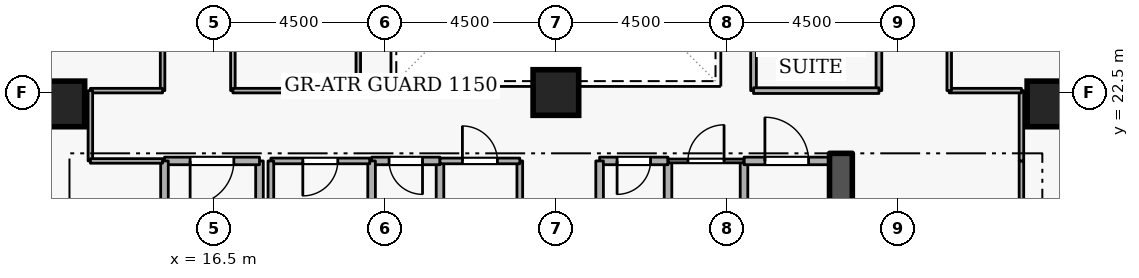
"""IFC4 building model, lengths in metres.
Left out: names, types, materials, properties, quantities, classifications, styles, units other than length and angle.
Written with IfcOpenShell. Run it as: python <this file> out.ifc"""

import sys

from ifc_helpers import new_model, si_unit, direction, frame, frame_2d, origin, origin_2d, place, context, subcontext, project, spatial, rectangle, extrude, element, fill, save


model = new_model("IFC4")
c1 = context("Model", 3, precision=1e-05, world=origin(), true_north=direction((0.0, 1.0)))
c2 = subcontext(c1, "Body", "Model", "MODEL_VIEW")
j1 = project(units=[si_unit("LENGTHUNIT", "METRE"), si_unit("PLANEANGLEUNIT", "RADIAN")], contexts=[c1])
p1 = place(None, origin())
s1 = spatial("IfcSite", under=j1, at=p1, CompositionType="ELEMENT")
p2 = place(p1, origin())
s2 = spatial("IfcBuilding", under=s1, at=p2, CompositionType="ELEMENT")
p3 = place(p2, frame((0.0, 0.0, 90.9)))
s3 = spatial("IfcBuildingStorey", under=s2, at=p3, CompositionType="ELEMENT", Elevation=90.9)
p4 = place(p3, frame((33.0, 15.2, 0.0), z_axis=(0.0, 0.0, 1.0), x_axis=(0.0, 1.0, 0.0)))
e1 = element("IfcWall", 1, at=p4, inside=s3, PredefinedType="SHEAR", context=c2, shape_type="SweptSolid", body=[
    extrude(rectangle(XDim=5.7, YDim=0.6, at=frame_2d((2.85, 0.0))), origin(), (0.0, 0.0, 1.0), 3.6),
])
for number, where, z_axis, x_axis in (
    (2, (12.5, 22.2, 0.0), (0.0, 0.0, 1.0), (1.0, 0.0, 0.0)),
    (3, (38.5, 22.2, 0.0), (0.0, 0.0, 1.0), (1.0, 0.0, 0.0)),
    (4, (25.5, 22.5, 0.0), (0.0, 0.0, 1.0), (1.0, 0.0, 0.0)),
):
    element("IfcColumn", number, at=place(p3, frame(where, z_axis=z_axis, x_axis=x_axis)), inside=s3, PredefinedType="COLUMN", context=c2, shape_type="SweptSolid", body=[
        extrude(rectangle(XDim=1.2, YDim=1.2, at=origin_2d()), origin(), (0.0, 0.0, 1.0), 3.6),
    ])
p5 = place(p3, frame((17.7, 18.4, 0.0), z_axis=(0.0, 0.0, 1.0), x_axis=(0.0, 1.0, 0.0)))
e5 = element("IfcWall", 5, at=p5, inside=s3, PredefinedType="STANDARD", context=c2, shape_type="SweptSolid", body=[
    extrude(rectangle(XDim=2.3, YDim=0.2, at=frame_2d((1.15, 0.0))), origin(), (0.0, 0.0, 1.0), 2.545),
])
p6 = place(p3, frame((17.7, 20.7, 0.0), z_axis=(0.0, 0.0, 1.0), x_axis=(-1.0, 0.0, 0.0)))
e6 = element("IfcWall", 6, at=p6, inside=s3, PredefinedType="STANDARD", context=c2, shape_type="SweptSolid", body=[
    extrude(rectangle(XDim=2.5, YDim=0.2, at=frame_2d((1.25, 0.0))), origin(), (0.0, 0.0, 1.0), 3.34),
])
p7 = place(p6, frame((0.675, 0.0, 0.0)))
e7 = element("IfcOpeningElement", 7, at=p7, cuts=e6, PredefinedType="OPENING", context=c2, shape_type="SweptSolid", body=[
    extrude(rectangle(XDim=1.15, YDim=2.1, at=frame_2d((0.575, 1.05))), frame((0.0, 0.11, 0.0), z_axis=(0.0, -1.0, 0.0), x_axis=(1.0, 0.0, 0.0)), (0.0, 0.0, 1.0), 0.22),
])
p8 = place(p3, frame((15.2, 20.7, 0.0), z_axis=(0.0, 0.0, 1.0), x_axis=(0.0, -1.0, 0.0)))
e8 = element("IfcWall", 8, at=p8, inside=s3, PredefinedType="STANDARD", context=c2, shape_type="SweptSolid", body=[
    extrude(rectangle(XDim=5.7, YDim=0.2, at=frame_2d((2.85, 0.0))), origin(), (0.0, 0.0, 1.0), 3.34),
])
p9 = place(p3, frame((28.45, 18.65, 0.0), z_axis=(0.0, 0.0, 1.0), x_axis=(0.0, 1.0, 0.0)))
e9 = element("IfcWall", 9, at=p9, inside=s3, PredefinedType="STANDARD", context=c2, shape_type="SweptSolid", body=[
    extrude(rectangle(XDim=2.05, YDim=0.2, at=frame_2d((1.025, 0.0))), origin(), (0.0, 0.0, 1.0), 3.34),
])
p10 = place(p3, frame((28.45, 20.7, 0.0), z_axis=(0.0, 0.0, 1.0), x_axis=(-1.0, 0.0, 0.0)))
e10 = element("IfcWall", 10, at=p10, inside=s3, PredefinedType="STANDARD", context=c2, shape_type="SweptSolid", body=[
    extrude(rectangle(XDim=1.8, YDim=0.2, at=frame_2d((0.9, 0.0))), origin(), (0.0, 0.0, 1.0), 3.34),
])
p11 = place(p10, frame((0.46, 0.0, 0.0)))
e11 = element("IfcOpeningElement", 11, at=p11, cuts=e10, PredefinedType="OPENING", context=c2, shape_type="SweptSolid", body=[
    extrude(rectangle(XDim=0.88, YDim=2.04, at=frame_2d((0.44, 1.02))), frame((0.0, 0.11, 0.0), z_axis=(0.0, -1.0, 0.0), x_axis=(1.0, 0.0, 0.0)), (0.0, 0.0, 1.0), 0.22),
])
for number, where, z_axis, x_axis in (
    (12, (26.65, 20.7, 0.0), (0.0, 0.0, 1.0), (0.0, -1.0, 0.0)),
    (13, (22.45, 18.65, 0.0), (0.0, 0.0, 1.0), (0.0, 1.0, 0.0)),
):
    element("IfcWall", number, at=place(p3, frame(where, z_axis=z_axis, x_axis=x_axis)), inside=s3, PredefinedType="STANDARD", context=c2, shape_type="SweptSolid", body=[
        extrude(rectangle(XDim=2.05, YDim=0.2, at=frame_2d((1.025, 0.0))), origin(), (0.0, 0.0, 1.0), 3.34),
    ])
p12 = place(p3, frame((22.45, 20.7, 0.0), z_axis=(0.0, 0.0, 1.0), x_axis=(-1.0, 0.0, 0.0)))
e14 = element("IfcWall", 14, at=p12, inside=s3, PredefinedType="STANDARD", context=c2, shape_type="SweptSolid", body=[
    extrude(rectangle(XDim=1.8, YDim=0.2, at=frame_2d((0.9, 0.0))), origin(), (0.0, 0.0, 1.0), 3.34),
])
p13 = place(p12, frame((0.46, 0.0, 0.0)))
e15 = element("IfcOpeningElement", 15, at=p13, cuts=e14, PredefinedType="OPENING", context=c2, shape_type="SweptSolid", body=[
    extrude(rectangle(XDim=0.88, YDim=2.04, at=frame_2d((0.44, 1.02))), frame((0.0, 0.11, 0.0), z_axis=(0.0, -1.0, 0.0), x_axis=(1.0, 0.0, 0.0)), (0.0, 0.0, 1.0), 0.22),
])
for number, where, z_axis, x_axis in (
    (16, (20.65, 20.7, 0.0), (0.0, 0.0, 1.0), (0.0, -1.0, 0.0)),
    (17, (30.45, 18.65, 0.0), (0.0, 0.0, 1.0), (0.0, 1.0, 0.0)),
):
    element("IfcWall", number, at=place(p3, frame(where, z_axis=z_axis, x_axis=x_axis)), inside=s3, PredefinedType="STANDARD", context=c2, shape_type="SweptSolid", body=[
        extrude(rectangle(XDim=2.05, YDim=0.2, at=frame_2d((1.025, 0.0))), origin(), (0.0, 0.0, 1.0), 3.34),
    ])
p14 = place(p3, frame((30.45, 20.7, 0.0), z_axis=(0.0, 0.0, 1.0), x_axis=(1.0, 0.0, 0.0)))
e18 = element("IfcWall", 18, at=p14, inside=s3, PredefinedType="STANDARD", context=c2, shape_type="SweptSolid", body=[
    extrude(rectangle(XDim=2.25, YDim=0.2, at=frame_2d((1.125, 0.0))), origin(), (0.0, 0.0, 1.0), 3.34),
])
p15 = place(p14, frame((0.55, 0.0, 0.0)))
e19 = element("IfcOpeningElement", 19, at=p15, cuts=e18, PredefinedType="OPENING", context=c2, shape_type="SweptSolid", body=[
    extrude(rectangle(XDim=1.15, YDim=2.1, at=frame_2d((0.575, 1.05))), frame((0.0, 0.11, 0.0), z_axis=(0.0, -1.0, 0.0), x_axis=(1.0, 0.0, 0.0)), (0.0, 0.0, 1.0), 0.22),
])
p16 = place(p3, frame((20.6, 20.7, 0.0), z_axis=(0.0, 0.0, 1.0), x_axis=(-1.0, 0.0, 0.0)))
e20 = element("IfcWall", 20, at=p16, inside=s3, PredefinedType="PARTITIONING", context=c2, shape_type="SweptSolid", body=[
    extrude(rectangle(XDim=2.6, YDim=0.15, at=frame_2d((1.3, 0.0))), origin(), (0.0, 0.0, 1.0), 3.34),
])
p17 = place(p16, frame((0.84, 0.0, 0.0)))
e21 = element("IfcOpeningElement", 21, at=p17, cuts=e20, PredefinedType="OPENING", context=c2, shape_type="SweptSolid", body=[
    extrude(rectangle(XDim=0.92, YDim=2.08, at=frame_2d((0.46, 1.04))), frame((0.0, 0.085, 0.0), z_axis=(0.0, -1.0, 0.0), x_axis=(1.0, 0.0, 0.0)), (0.0, 0.0, 1.0), 0.17),
])
p18 = place(p3, frame((18.0, 20.7, 0.0), z_axis=(0.0, 0.0, 1.0), x_axis=(0.0, -1.0, 0.0)))
e22 = element("IfcWall", 22, at=p18, inside=s3, PredefinedType="PARTITIONING", context=c2, shape_type="SweptSolid", body=[
    extrude(rectangle(XDim=2.05, YDim=0.15, at=frame_2d((1.025, 0.0))), origin(), (0.0, 0.0, 1.0), 2.545),
])
p19 = place(p3, frame((24.55, 20.7, 0.0), z_axis=(0.0, 0.0, 1.0), x_axis=(0.0, -1.0, 0.0)))
e23 = element("IfcWall", 23, at=p19, inside=s3, PredefinedType="PARTITIONING", context=c2, shape_type="SweptSolid", body=[
    extrude(rectangle(XDim=2.05, YDim=0.15, at=frame_2d((1.025, 0.0))), origin(), (0.0, 0.0, 1.0), 3.34),
])
p20 = place(p3, frame((22.45, 20.7, 0.0), z_axis=(0.0, 0.0, 1.0), x_axis=(1.0, 0.0, 0.0)))
e24 = element("IfcWall", 24, at=p20, inside=s3, PredefinedType="PARTITIONING", context=c2, shape_type="SweptSolid", body=[
    extrude(rectangle(XDim=2.1, YDim=0.15, at=frame_2d((1.05, 0.0))), origin(), (0.0, 0.0, 1.0), 3.34),
])
p21 = place(p20, frame((0.59, 0.0, 0.0)))
e25 = element("IfcOpeningElement", 25, at=p21, cuts=e24, PredefinedType="OPENING", context=c2, shape_type="SweptSolid", body=[
    extrude(rectangle(XDim=0.92, YDim=2.08, at=frame_2d((0.46, 1.04))), frame((0.0, 0.085, 0.0), z_axis=(0.0, -1.0, 0.0), x_axis=(1.0, 0.0, 0.0)), (0.0, 0.0, 1.0), 0.17),
])
p22 = place(p3, frame((28.45, 20.7, 0.0), z_axis=(0.0, 0.0, 1.0), x_axis=(1.0, 0.0, 0.0)))
e26 = element("IfcWall", 26, at=p22, inside=s3, PredefinedType="PARTITIONING", context=c2, shape_type="SweptSolid", body=[
    extrude(rectangle(XDim=2.0, YDim=0.1, at=frame_2d((1.0, 0.0))), origin(), (0.0, 0.0, 1.0), 3.34),
])
p23 = place(p22, frame((0.525, 0.0, 0.0)))
e27 = element("IfcOpeningElement", 27, at=p23, cuts=e26, PredefinedType="OPENING", context=c2, shape_type="SweptSolid", body=[
    extrude(rectangle(XDim=0.95, YDim=2.1, at=frame_2d((0.475, 1.05))), frame((0.0, 0.06, 0.0), z_axis=(0.0, -1.0, 0.0), x_axis=(1.0, 0.0, 0.0)), (0.0, 0.0, 1.0), 0.12),
])
p24 = place(p3, frame((15.15, 27.0, 0.0), z_axis=(0.0, 0.0, 1.0), x_axis=(0.0, -1.0, 0.0)))
e28 = element("IfcWall", 28, at=p24, inside=s3, PredefinedType="PARTITIONING", context=c2, shape_type="SweptSolid", body=[
    extrude(rectangle(XDim=4.45, YDim=0.12, at=frame_2d((2.225, 0.0))), origin(), (0.0, 0.0, 1.0), 3.34),
])
p25 = place(p24, frame((1.7, 0.0, 0.0)))
e29 = element("IfcOpeningElement", 29, at=p25, cuts=e28, PredefinedType="OPENING", context=c2, shape_type="SweptSolid", body=[
    extrude(rectangle(XDim=1.05, YDim=2.1, at=frame_2d((0.525, 1.05))), frame((0.0, 0.07, 0.0), z_axis=(0.0, -1.0, 0.0), x_axis=(1.0, 0.0, 0.0)), (0.0, 0.0, 1.0), 0.14),
])
p26 = place(p3, frame((15.15, 22.55, 0.0), z_axis=(0.0, 0.0, 1.0), x_axis=(-1.0, 0.0, 0.0)))
e30 = element("IfcWall", 30, at=p26, inside=s3, PredefinedType="PARTITIONING", context=c2, shape_type="SweptSolid", body=[
    extrude(rectangle(XDim=1.9, YDim=0.12, at=frame_2d((0.95, 0.0))), origin(), (0.0, 0.0, 1.0), 3.34),
])
p27 = place(p3, frame((13.25, 22.55, 0.0), z_axis=(0.0, 0.0, 1.0), x_axis=(0.0, -1.0, 0.0)))
e31 = element("IfcWall", 31, at=p27, inside=s3, PredefinedType="PARTITIONING", context=c2, shape_type="SweptSolid", body=[
    extrude(rectangle(XDim=1.85, YDim=0.12, at=frame_2d((0.925, 0.0))), origin(), (0.0, 0.0, 1.0), 3.34),
])
p28 = place(p3, frame((13.25, 20.7, 0.0), z_axis=(0.0, 0.0, 1.0), x_axis=(1.0, 0.0, 0.0)))
e32 = element("IfcWall", 32, at=p28, inside=s3, PredefinedType="PARTITIONING", context=c2, shape_type="SweptSolid", body=[
    extrude(rectangle(XDim=1.9, YDim=0.12, at=frame_2d((0.95, 0.0))), origin(), (0.0, 0.0, 1.0), 3.34),
])
p29 = place(p3, frame((37.75, 17.55, 0.0), z_axis=(0.0, 0.0, 1.0), x_axis=(0.0, 1.0, 0.0)))
e33 = element("IfcWall", 33, at=p29, inside=s3, PredefinedType="PARTITIONING", context=c2, shape_type="SweptSolid", body=[
    extrude(rectangle(XDim=3.15, YDim=0.12, at=frame_2d((1.575, 0.0))), origin(), (0.0, 0.0, 1.0), 3.34),
])
p30 = place(p3, frame((37.75, 20.7, 0.0), z_axis=(0.0, 0.0, 1.0), x_axis=(0.0, 1.0, 0.0)))
e34 = element("IfcWall", 34, at=p30, inside=s3, PredefinedType="PARTITIONING", context=c2, shape_type="SweptSolid", body=[
    extrude(rectangle(XDim=1.85, YDim=0.12, at=frame_2d((0.925, 0.0))), origin(), (0.0, 0.0, 1.0), 3.34),
])
p31 = place(p3, frame((37.75, 22.55, 0.0), z_axis=(0.0, 0.0, 1.0), x_axis=(-1.0, 0.0, 0.0)))
e35 = element("IfcWall", 35, at=p31, inside=s3, PredefinedType="PARTITIONING", context=c2, shape_type="SweptSolid", body=[
    extrude(rectangle(XDim=1.9, YDim=0.12, at=frame_2d((0.95, 0.0))), origin(), (0.0, 0.0, 1.0), 3.34),
])
p32 = place(p3, frame((35.85, 22.55, 0.0), z_axis=(0.0, 0.0, 1.0), x_axis=(0.0, 1.0, 0.0)))
e36 = element("IfcWall", 36, at=p32, inside=s3, PredefinedType="PARTITIONING", context=c2, shape_type="SweptSolid", body=[
    extrude(rectangle(XDim=4.45, YDim=0.12, at=frame_2d((2.225, 0.0))), origin(), (0.0, 0.0, 1.0), 3.34),
])
p33 = place(p32, frame((1.7, 0.0, 0.0)))
e37 = element("IfcOpeningElement", 37, at=p33, cuts=e36, PredefinedType="OPENING", context=c2, shape_type="SweptSolid", body=[
    extrude(rectangle(XDim=1.05, YDim=2.1, at=frame_2d((0.525, 1.05))), frame((0.0, 0.07, 0.0), z_axis=(0.0, -1.0, 0.0), x_axis=(1.0, 0.0, 0.0)), (0.0, 0.0, 1.0), 0.14),
])
p34 = place(p3, frame((30.7, 22.55, 0.0), z_axis=(0.0, 0.0, 1.0), x_axis=(0.0, 1.0, 0.0)))
e38 = element("IfcWall", 38, at=p34, inside=s3, PredefinedType="PARTITIONING", context=c2, shape_type="SweptSolid", body=[
    extrude(rectangle(XDim=8.9, YDim=0.15, at=frame_2d((4.45, 0.0))), origin(), (0.0, 0.0, 1.0), 3.34),
])
p35 = place(p3, frame((34.0, 31.45, 0.0), z_axis=(0.0, 0.0, 1.0), x_axis=(0.0, -1.0, 0.0)))
e39 = element("IfcWall", 39, at=p35, inside=s3, PredefinedType="PARTITIONING", context=c2, shape_type="SweptSolid", body=[
    extrude(rectangle(XDim=8.9, YDim=0.15, at=frame_2d((4.45, 0.0))), origin(), (0.0, 0.0, 1.0), 3.34),
])
p36 = place(p35, frame((3.8, 0.0, 0.0)))
e40 = element("IfcOpeningElement", 40, at=p36, cuts=e39, PredefinedType="OPENING", context=c2, shape_type="SweptSolid", body=[
    extrude(rectangle(XDim=1.3, YDim=2.12, at=frame_2d((0.65, 1.06))), frame((0.0, 0.085, 0.0), z_axis=(0.0, -1.0, 0.0), x_axis=(1.0, 0.0, 0.0)), (0.0, 0.0, 1.0), 0.17),
])
p37 = place(p3, frame((34.0, 22.55, 0.0), z_axis=(0.0, 0.0, 1.0), x_axis=(-1.0, 0.0, 0.0)))
e41 = element("IfcWall", 41, at=p37, inside=s3, PredefinedType="PARTITIONING", context=c2, shape_type="SweptSolid", body=[
    extrude(rectangle(XDim=3.3, YDim=0.15, at=frame_2d((1.65, 0.0))), origin(), (0.0, 0.0, 1.0), 3.34),
])
p38 = place(p3, frame((17.0, 22.55, 0.0), z_axis=(0.0, 0.0, 1.0), x_axis=(0.0, 1.0, 0.0)))
e42 = element("IfcWall", 42, at=p38, inside=s3, PredefinedType="PARTITIONING", context=c2, shape_type="SweptSolid", body=[
    extrude(rectangle(XDim=8.9, YDim=0.12, at=frame_2d((4.45, 0.0))), origin(), (0.0, 0.0, 1.0), 3.34),
])
p39 = place(p38, frame((3.975, 0.0, 0.0)))
e43 = element("IfcOpeningElement", 43, at=p39, cuts=e42, PredefinedType="OPENING", context=c2, shape_type="SweptSolid", body=[
    extrude(rectangle(XDim=0.95, YDim=2.1, at=frame_2d((0.475, 1.05))), frame((0.0, 0.07, 0.0), z_axis=(0.0, -1.0, 0.0), x_axis=(1.0, 0.0, 0.0)), (0.0, 0.0, 1.0), 0.14),
])
p40 = place(p3, frame((20.3, 31.45, 0.0), z_axis=(0.0, 0.0, 1.0), x_axis=(0.0, -1.0, 0.0)))
e44 = element("IfcWall", 44, at=p40, inside=s3, PredefinedType="PARTITIONING", context=c2, shape_type="SweptSolid", body=[
    extrude(rectangle(XDim=8.9, YDim=0.12, at=frame_2d((4.45, 0.0))), origin(), (0.0, 0.0, 1.0), 3.34),
])
p41 = place(p3, frame((20.3, 22.55, 0.0), z_axis=(0.0, 0.0, 1.0), x_axis=(-1.0, 0.0, 0.0)))
e45 = element("IfcWall", 45, at=p41, inside=s3, PredefinedType="PARTITIONING", context=c2, shape_type="SweptSolid", body=[
    extrude(rectangle(XDim=3.3, YDim=0.12, at=frame_2d((1.65, 0.0))), origin(), (0.0, 0.0, 1.0), 3.34),
])
p42 = place(p7, origin())
e46 = element("IfcDoor", 46, at=p42, inside=s3, OperationType="SINGLE_SWING_RIGHT", PredefinedType="DOOR", context=c2, shape_type="SweptSolid", body=[
    extrude(rectangle(XDim=1.15, YDim=2.1, at=frame_2d((0.575, 1.05))), frame((0.0, 0.025, 0.0), z_axis=(0.0, -1.0, 0.0), x_axis=(1.0, 0.0, 0.0)), (0.0, 0.0, 1.0), 0.05),
])
fill(e7, e46)
p43 = place(p11, origin())
e47 = element("IfcDoor", 47, at=p43, inside=s3, OperationType="SINGLE_SWING_RIGHT", PredefinedType="DOOR", context=c2, shape_type="SweptSolid", body=[
    extrude(rectangle(XDim=0.88, YDim=2.04, at=frame_2d((0.44, 1.02))), frame((0.0, 0.025, 0.0), z_axis=(0.0, -1.0, 0.0), x_axis=(1.0, 0.0, 0.0)), (0.0, 0.0, 1.0), 0.05),
])
fill(e11, e47)
p44 = place(p13, origin())
e48 = element("IfcDoor", 48, at=p44, inside=s3, OperationType="SINGLE_SWING_LEFT", PredefinedType="DOOR", context=c2, shape_type="SweptSolid", body=[
    extrude(rectangle(XDim=0.88, YDim=2.04, at=frame_2d((0.44, 1.02))), frame((0.0, 0.025, 0.0), z_axis=(0.0, -1.0, 0.0), x_axis=(1.0, 0.0, 0.0)), (0.0, 0.0, 1.0), 0.05),
])
fill(e15, e48)
p45 = place(p17, origin())
e49 = element("IfcDoor", 49, at=p45, inside=s3, OperationType="SINGLE_SWING_RIGHT", PredefinedType="DOOR", context=c2, shape_type="SweptSolid", body=[
    extrude(rectangle(XDim=0.92, YDim=2.08, at=frame_2d((0.46, 1.04))), frame((0.0, 0.025, 0.0), z_axis=(0.0, -1.0, 0.0), x_axis=(1.0, 0.0, 0.0)), (0.0, 0.0, 1.0), 0.05),
])
fill(e21, e49)
p46 = place(p21, origin())
e50 = element("IfcDoor", 50, at=p46, inside=s3, OperationType="SINGLE_SWING_LEFT", PredefinedType="DOOR", context=c2, shape_type="SweptSolid", body=[
    extrude(rectangle(XDim=0.92, YDim=2.08, at=frame_2d((0.46, 1.04))), frame((0.0, 0.025, 0.0), z_axis=(0.0, -1.0, 0.0), x_axis=(1.0, 0.0, 0.0)), (0.0, 0.0, 1.0), 0.05),
])
fill(e25, e50)
p47 = place(p23, origin())
e51 = element("IfcDoor", 51, at=p47, inside=s3, OperationType="SINGLE_SWING_RIGHT", PredefinedType="DOOR", context=c2, shape_type="SweptSolid", body=[
    extrude(rectangle(XDim=0.95, YDim=2.1, at=frame_2d((0.475, 1.05))), frame((0.0, 0.025, 0.0), z_axis=(0.0, -1.0, 0.0), x_axis=(1.0, 0.0, 0.0)), (0.0, 0.0, 1.0), 0.05),
])
fill(e27, e51)
p48 = place(p15, origin())
e52 = element("IfcDoor", 52, at=p48, inside=s3, OperationType="SINGLE_SWING_LEFT", PredefinedType="DOOR", context=c2, shape_type="SweptSolid", body=[
    extrude(rectangle(XDim=1.15, YDim=2.1, at=frame_2d((0.575, 1.05))), frame((0.0, 0.025, 0.0), z_axis=(0.0, -1.0, 0.0), x_axis=(1.0, 0.0, 0.0)), (0.0, 0.0, 1.0), 0.05),
])
fill(e19, e52)
save(model, sys.argv[1])
